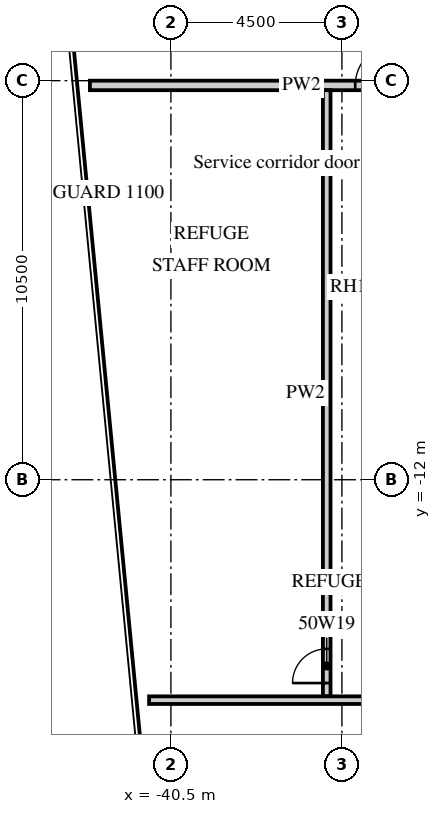
"""IFC4 building model, lengths in metres.
Left out: names, types, materials, properties, quantities, classifications, styles, units other than length and angle.
Written with IfcOpenShell. Run it as: python <this file> out.ifc"""

import sys

from ifc_helpers import new_model, si_unit, direction, frame, frame_2d, origin, place, context, subcontext, project, spatial, rectangle, extrude, element, fill, save


model = new_model("IFC4")
c1 = context("Model", 3, precision=1e-05, world=origin(), true_north=direction((0.0, 1.0)))
c2 = subcontext(c1, "Body", "Model", "MODEL_VIEW")
j1 = project(units=[si_unit("LENGTHUNIT", "METRE"), si_unit("PLANEANGLEUNIT", "RADIAN")], contexts=[c1])
p1 = place(None, origin())
s1 = spatial("IfcSite", under=j1, at=p1, CompositionType="ELEMENT")
p2 = place(p1, origin())
s2 = spatial("IfcBuilding", under=s1, at=p2, CompositionType="ELEMENT")
p3 = place(p2, frame((0.0, 0.0, 206.5)))
s3 = spatial("IfcBuildingStorey", under=s2, at=p3, CompositionType="ELEMENT", Elevation=206.5)
p4 = place(p3, frame((-42.632, -1.625, 0.0), z_axis=(0.0, 0.0, 1.0), x_axis=(1.0, 0.0, 0.0)))
e1 = element("IfcWall", 1, at=p4, inside=s3, PredefinedType="PARTITIONING", context=c2, shape_type="SweptSolid", body=[
    extrude(rectangle(XDim=11.132, YDim=0.25, at=frame_2d((5.566, 0.0))), origin(), (0.0, 0.0, 1.0), 4.2),
])
p5 = place(p4, frame((9.207, 0.0, 0.0)))
e2 = element("IfcOpeningElement", 2, at=p5, cuts=e1, PredefinedType="OPENING", context=c2, shape_type="SweptSolid", body=[
    extrude(rectangle(XDim=1.3, YDim=2.1, at=frame_2d((0.65, 1.05))), frame((0.0, 0.135, 0.0), z_axis=(0.0, -1.0, 0.0), x_axis=(1.0, 0.0, 0.0)), (0.0, 0.0, 1.0), 0.27),
])
p6 = place(p4, frame((6.981, 0.0, 0.0)))
e3 = element("IfcOpeningElement", 3, at=p6, cuts=e1, PredefinedType="OPENING", context=c2, shape_type="SweptSolid", body=[
    extrude(rectangle(XDim=1.1, YDim=2.1, at=frame_2d((0.55, 1.05))), frame((0.0, 0.135, 0.0), z_axis=(0.0, -1.0, 0.0), x_axis=(1.0, 0.0, 0.0)), (0.0, 0.0, 1.0), 0.27),
])
p7 = place(p3, frame((-36.4, -17.7, 0.0), z_axis=(0.0, 0.0, 1.0), x_axis=(0.0, 1.0, 0.0)))
e4 = element("IfcWall", 4, at=p7, inside=s3, PredefinedType="PARTITIONING", context=c2, shape_type="SweptSolid", body=[
    extrude(rectangle(XDim=15.95, YDim=0.2, at=frame_2d((7.975, 0.0))), origin(), (0.0, 0.0, 1.0), 4.2),
])
p8 = place(p7, frame((0.35, 0.0, 0.0)))
e5 = element("IfcOpeningElement", 5, at=p8, cuts=e4, PredefinedType="OPENING", context=c2, shape_type="SweptSolid", body=[
    extrude(rectangle(XDim=0.9, YDim=2.1, at=frame_2d((0.45, 1.05))), frame((0.0, 0.11, 0.0), z_axis=(0.0, -1.0, 0.0), x_axis=(1.0, 0.0, 0.0)), (0.0, 0.0, 1.0), 0.22),
])
p9 = place(p3, frame((-41.074, -17.8, 0.0), z_axis=(0.0, 0.0, 1.0), x_axis=(1.0, 0.0, 0.0)))
e6 = element("IfcWall", 6, at=p9, inside=s3, PredefinedType="PARTITIONING", context=c2, shape_type="SweptSolid", body=[
    extrude(rectangle(XDim=27.474, YDim=0.2, at=frame_2d((13.737, 0.0))), origin(), (0.0, 0.0, 1.0), 4.2),
])
p10 = place(p9, frame((8.762, 0.0, 0.0)))
e7 = element("IfcOpeningElement", 7, at=p10, cuts=e6, PredefinedType="OPENING", context=c2, shape_type="SweptSolid", body=[
    extrude(rectangle(XDim=0.9, YDim=2.1, at=frame_2d((0.45, 1.05))), frame((0.0, 0.11, 0.0), z_axis=(0.0, -1.0, 0.0), x_axis=(1.0, 0.0, 0.0)), (0.0, 0.0, 1.0), 0.22),
])
p11 = place(p9, frame((17.062, 0.0, 0.0)))
e8 = element("IfcOpeningElement", 8, at=p11, cuts=e6, PredefinedType="OPENING", context=c2, shape_type="SweptSolid", body=[
    extrude(rectangle(XDim=0.9, YDim=2.1, at=frame_2d((0.45, 1.05))), frame((0.0, 0.11, 0.0), z_axis=(0.0, -1.0, 0.0), x_axis=(1.0, 0.0, 0.0)), (0.0, 0.0, 1.0), 0.22),
])
p12 = place(p6, origin())
e9 = element("IfcDoor", 9, at=p12, inside=s3, OperationType="SINGLE_SWING_RIGHT", PredefinedType="DOOR", context=c2, shape_type="SweptSolid", body=[
    extrude(rectangle(XDim=1.1, YDim=2.1, at=frame_2d((0.55, 1.05))), frame((0.0, 0.025, 0.0), z_axis=(0.0, -1.0, 0.0), x_axis=(1.0, 0.0, 0.0)), (0.0, 0.0, 1.0), 0.05),
])
fill(e3, e9)
p13 = place(p8, origin())
e10 = element("IfcDoor", 10, at=p13, inside=s3, OperationType="SINGLE_SWING_LEFT", PredefinedType="DOOR", context=c2, shape_type="SweptSolid", body=[
    extrude(rectangle(XDim=0.9, YDim=2.1, at=frame_2d((0.45, 1.05))), frame((0.0, 0.025, 0.0), z_axis=(0.0, -1.0, 0.0), x_axis=(1.0, 0.0, 0.0)), (0.0, 0.0, 1.0), 0.05),
])
fill(e5, e10)
save(model, sys.argv[1])
